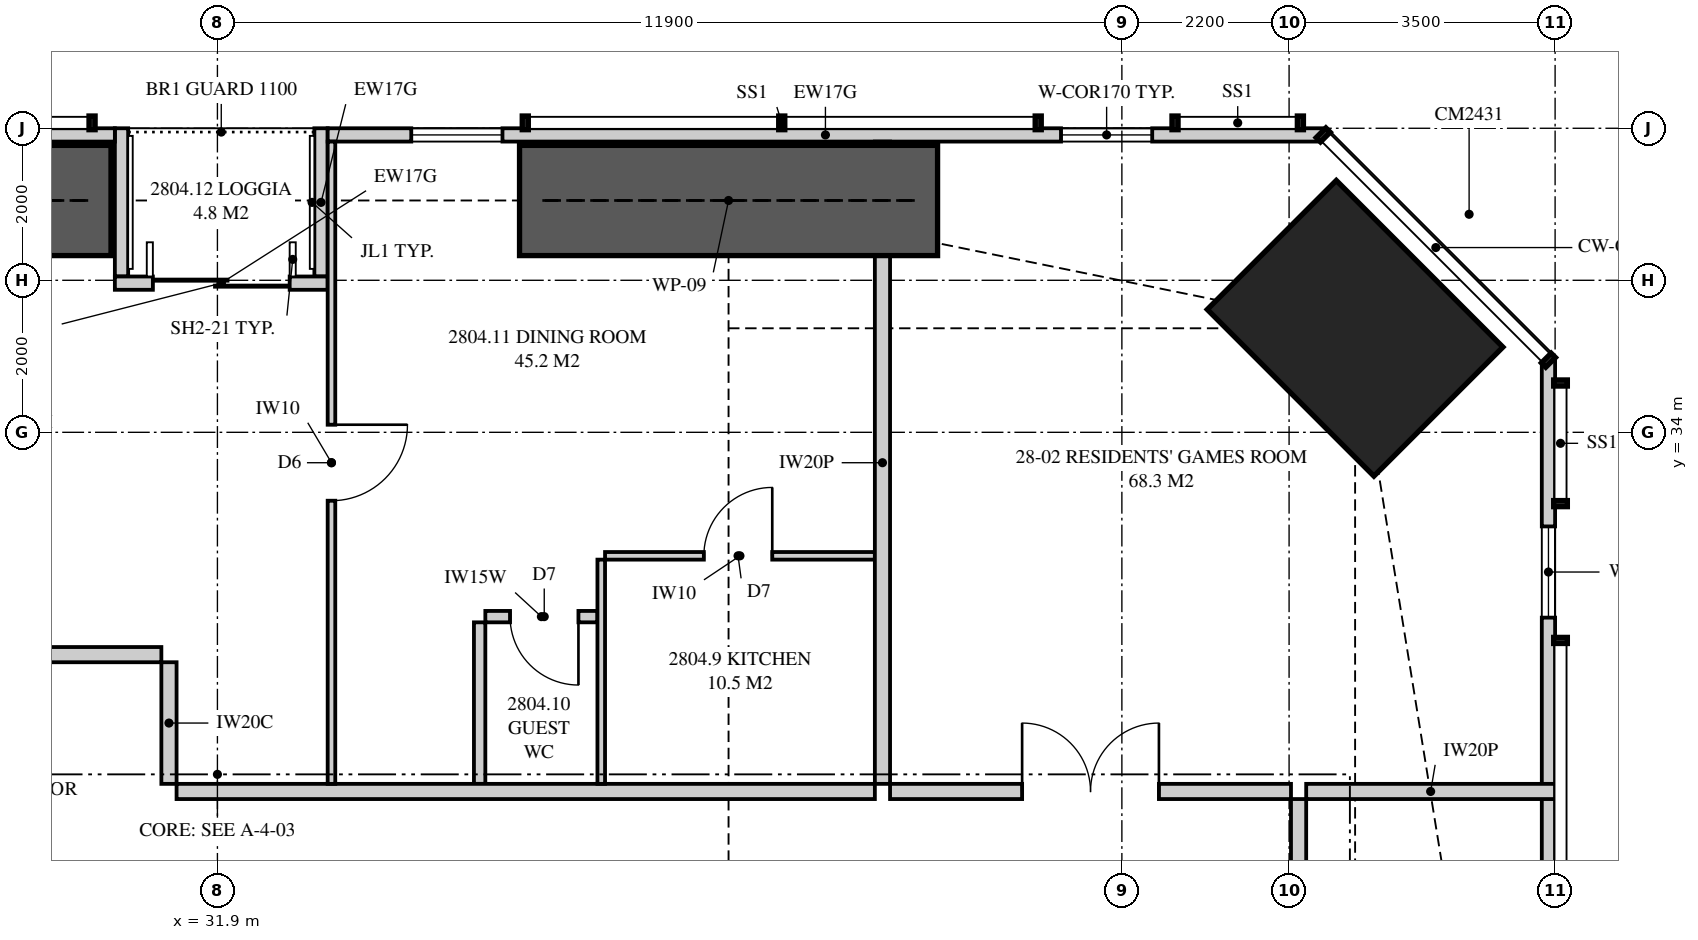
"""IFC4 building model, lengths in metres.
Left out: names, types, materials, properties, quantities, classifications, styles, units other than length and angle.
Written with IfcOpenShell. Run it as: python <this file> out.ifc"""

import sys

from ifc_helpers import new_model, si_unit, direction, frame, frame_2d, origin, origin_2d, place, context, subcontext, project, spatial, polyline, rectangle, outline, extrude, element, fill, save


model = new_model("IFC4")
c1 = context("Model", 3, precision=1e-05, world=origin(), true_north=direction((0.0, 1.0)))
c2 = subcontext(c1, "Body", "Model", "MODEL_VIEW")
j1 = project(units=[si_unit("LENGTHUNIT", "METRE"), si_unit("PLANEANGLEUNIT", "RADIAN")], contexts=[c1])
p1 = place(None, origin())
s1 = spatial("IfcSite", under=j1, at=p1, CompositionType="ELEMENT")
p2 = place(p1, origin())
s2 = spatial("IfcBuilding", under=s1, at=p2, CompositionType="ELEMENT")
p3 = place(p2, frame((0.0, 0.0, 104.85)))
s3 = spatial("IfcBuildingStorey", under=s2, at=p3, CompositionType="ELEMENT", Elevation=104.85)
p4 = place(p3, frame((46.869, 35.369, 0.0), z_axis=(0.0, 0.0, 1.0), x_axis=(-0.707106781187, -0.707106781187, 0.0)))
e1 = element("IfcColumn", 1, at=p4, inside=s3, PredefinedType="COLUMN", context=c2, shape_type="SweptSolid", body=[
    extrude(rectangle(XDim=2.4, YDim=3.1, at=origin_2d()), origin(), (0.0, 0.0, 1.0), 3.35),
])
p5 = place(p3, frame((49.413, 3.051, 0.0), z_axis=(0.0, 0.0, 1.0), x_axis=(0.0, 1.0, 0.0)))
e2 = element("IfcWall", 2, at=p5, inside=s3, PredefinedType="SOLIDWALL", context=c2, shape_type="SweptSolid", body=[
    extrude(outline(polyline([(0.0, 0.0), (31.897, 0.0), (31.897, 3.11), (22.167, 3.11), (22.167, 2.15), (22.074, 2.15), (22.074, 3.11), (21.949, 3.11), (21.949, 2.15), (9.949, 2.15), (9.949, 3.11), (9.823, 3.11), (9.823, 2.15), (9.73, 2.15), (9.73, 3.11), (0.0, 3.11), (0.0, 0.0)])), frame((0.0, 0.087, 0.0), z_axis=(0.0, -1.0, 0.0), x_axis=(1.0, 0.0, 0.0)), (0.0, 0.0, 1.0), 0.175),
])
p6 = place(p5, frame((2.224, 0.0, 0.4)))
e3 = element("IfcOpeningElement", 3, at=p6, cuts=e2, PredefinedType="OPENING", context=c2, shape_type="SweptSolid", body=[
    extrude(rectangle(XDim=1.8, YDim=1.7, at=frame_2d((0.9, 0.85))), frame((0.0, 0.097, 0.0), z_axis=(0.0, -1.0, 0.0), x_axis=(1.0, 0.0, 0.0)), (0.0, 0.0, 1.0), 0.195),
])
p7 = place(p5, frame((14.849, 0.0, 0.4)))
e4 = element("IfcOpeningElement", 4, at=p7, cuts=e2, PredefinedType="OPENING", context=c2, shape_type="SweptSolid", body=[
    extrude(rectangle(XDim=1.2, YDim=1.7, at=frame_2d((0.6, 0.85))), frame((0.0, 0.097, 0.0), z_axis=(0.0, -1.0, 0.0), x_axis=(1.0, 0.0, 0.0)), (0.0, 0.0, 1.0), 0.195),
])
p8 = place(p5, frame((28.51, 0.0, 0.4)))
e5 = element("IfcOpeningElement", 5, at=p8, cuts=e2, PredefinedType="OPENING", context=c2, shape_type="SweptSolid", body=[
    extrude(rectangle(XDim=1.2, YDim=1.7, at=frame_2d((0.6, 0.85))), frame((0.0, 0.097, 0.0), z_axis=(0.0, -1.0, 0.0), x_axis=(1.0, 0.0, 0.0)), (0.0, 0.0, 1.0), 0.195),
])
p9 = place(p3, frame((46.449, 37.913, 0.0), z_axis=(0.0, 0.0, 1.0), x_axis=(-1.0, 0.0, 0.0)))
e6 = element("IfcWall", 6, at=p9, inside=s3, PredefinedType="SOLIDWALL", context=c2, shape_type="SweptSolid", body=[
    extrude(outline(polyline([(0.0, 0.0), (13.098, 0.0), (13.098, 2.15), (7.824, 2.15), (7.824, 3.11), (7.666, 3.11), (7.666, 2.15), (7.62, 2.15), (7.62, 3.11), (0.0, 3.11), (0.0, 0.0)])), frame((0.0, 0.087, 0.0), z_axis=(0.0, -1.0, 0.0), x_axis=(1.0, 0.0, 0.0)), (0.0, 0.0, 1.0), 0.175),
])
p10 = place(p9, frame((2.25, 0.0, 0.4)))
e7 = element("IfcOpeningElement", 7, at=p10, cuts=e6, PredefinedType="OPENING", context=c2, shape_type="SweptSolid", body=[
    extrude(rectangle(XDim=1.2, YDim=1.7, at=frame_2d((0.6, 0.85))), frame((0.0, 0.097, 0.0), z_axis=(0.0, -1.0, 0.0), x_axis=(1.0, 0.0, 0.0)), (0.0, 0.0, 1.0), 0.195),
])
p11 = place(p9, frame((10.798, 0.0, 0.4)))
e8 = element("IfcOpeningElement", 8, at=p11, cuts=e6, PredefinedType="OPENING", context=c2, shape_type="SweptSolid", body=[
    extrude(rectangle(XDim=1.2, YDim=1.7, at=frame_2d((0.6, 0.85))), frame((0.0, 0.097, 0.0), z_axis=(0.0, -1.0, 0.0), x_axis=(1.0, 0.0, 0.0)), (0.0, 0.0, 1.0), 0.195),
])
p12 = place(p3, frame((30.551, 37.913, 0.0), z_axis=(0.0, 0.0, 1.0), x_axis=(-1.0, 0.0, 0.0)))
e9 = element("IfcWall", 9, at=p12, inside=s3, PredefinedType="SOLIDWALL", context=c2, shape_type="SweptSolid", body=[
    extrude(outline(polyline([(0.0, 0.0), (21.499, 0.0), (21.499, 3.11), (13.879, 3.11), (13.879, 2.15), (13.834, 2.15), (13.834, 3.11), (13.676, 3.11), (13.676, 2.15), (0.0, 2.15), (0.0, 0.0)])), frame((0.0, 0.087, 0.0), z_axis=(0.0, -1.0, 0.0), x_axis=(1.0, 0.0, 0.0)), (0.0, 0.0, 1.0), 0.175),
])
p13 = place(p12, frame((5.826, 0.0, 0.4)))
e10 = element("IfcOpeningElement", 10, at=p13, cuts=e9, PredefinedType="OPENING", context=c2, shape_type="SweptSolid", body=[
    extrude(rectangle(XDim=1.8, YDim=1.7, at=frame_2d((0.9, 0.85))), frame((0.0, 0.097, 0.0), z_axis=(0.0, -1.0, 0.0), x_axis=(1.0, 0.0, 0.0)), (0.0, 0.0, 1.0), 0.195),
])
p14 = place(p12, frame((8.993, 0.0, 0.4)))
e11 = element("IfcOpeningElement", 11, at=p14, cuts=e9, PredefinedType="OPENING", context=c2, shape_type="SweptSolid", body=[
    extrude(rectangle(XDim=1.8, YDim=1.7, at=frame_2d((0.9, 0.85))), frame((0.0, 0.097, 0.0), z_axis=(0.0, -1.0, 0.0), x_axis=(1.0, 0.0, 0.0)), (0.0, 0.0, 1.0), 0.195),
])
p15 = place(p12, frame((16.566, 0.0, 0.4)))
e12 = element("IfcOpeningElement", 12, at=p15, cuts=e9, PredefinedType="OPENING", context=c2, shape_type="SweptSolid", body=[
    extrude(rectangle(XDim=1.8, YDim=1.7, at=frame_2d((0.9, 0.85))), frame((0.0, 0.097, 0.0), z_axis=(0.0, -1.0, 0.0), x_axis=(1.0, 0.0, 0.0)), (0.0, 0.0, 1.0), 0.195),
])
p16 = place(p3, frame((33.351, 35.962, 0.0), z_axis=(0.0, 0.0, 1.0), x_axis=(-1.0, 0.0, 0.0)))
e13 = element("IfcWall", 13, at=p16, inside=s3, PredefinedType="SOLIDWALL", context=c2, shape_type="SweptSolid", body=[
    extrude(rectangle(XDim=2.8, YDim=0.175, at=frame_2d((1.4, 0.0))), origin(), (0.0, 0.0, 1.0), 3.11),
])
p17 = place(p16, frame((0.5, 0.0, 0.0)))
e14 = element("IfcOpeningElement", 14, at=p17, cuts=e13, PredefinedType="OPENING", context=c2, shape_type="SweptSolid", body=[
    extrude(rectangle(XDim=1.8, YDim=2.1, at=frame_2d((0.9, 1.05))), frame((0.0, 0.097, 0.0), z_axis=(0.0, -1.0, 0.0), x_axis=(1.0, 0.0, 0.0)), (0.0, 0.0, 1.0), 0.195),
])
for number, where, z_axis, x_axis in (
    (15, (33.263, 38.0, 0.0), (0.0, 0.0, 1.0), (0.0, -1.0, 0.0)),
    (16, (30.638, 38.0, 0.0), (0.0, 0.0, 1.0), (0.0, -1.0, 0.0)),
):
    element("IfcWall", number, at=place(p3, frame(where, z_axis=z_axis, x_axis=x_axis)), inside=s3, PredefinedType="SOLIDWALL", context=c2, shape_type="SweptSolid", body=[
        extrude(outline(polyline([(0.0, 0.0), (1.95, 0.0), (1.95, 3.11), (1.75, 3.11), (1.75, 2.15), (0.15, 2.15), (0.15, 3.11), (0.0, 3.11), (0.0, 0.0)])), frame((0.0, 0.087, 0.0), z_axis=(0.0, -1.0, 0.0), x_axis=(1.0, 0.0, 0.0)), (0.0, 0.0, 1.0), 0.175),
    ])
p18 = place(p3, frame((40.65, 37.825, 0.0), z_axis=(0.0, 0.0, 1.0), x_axis=(0.0, -1.0, 0.0)))
e17 = element("IfcWall", 17, at=p18, inside=s3, PredefinedType="PARTITIONING", context=c2, shape_type="SweptSolid", body=[
    extrude(outline(polyline([(0.259, 3.11), (0.0, 3.11), (0.0, 0.0), (0.529, 0.0), (0.529, 0.12), (1.021, 0.12), (1.021, 0.0), (8.45, 0.0), (8.45, 3.11), (3.766, 3.11), (3.766, 2.51), (2.117, 2.51), (2.117, 2.15), (1.021, 2.15), (1.021, 2.03), (0.529, 2.03), (0.529, 2.15), (0.259, 2.15), (0.259, 3.11)])), frame((0.0, 0.1, 0.0), z_axis=(0.0, -1.0, 0.0), x_axis=(1.0, 0.0, 0.0)), (0.0, 0.0, 1.0), 0.2),
])
p19 = place(p3, frame((37.0, 32.375, 0.0), z_axis=(0.0, 0.0, 1.0), x_axis=(1.0, 0.0, 0.0)))
e18 = element("IfcWall", 18, at=p19, inside=s3, PredefinedType="PARTITIONING", context=c2, shape_type="SweptSolid", body=[
    extrude(outline(polyline([(0.0, 0.0), (3.55, 0.0), (3.55, 3.11), (1.912, 3.11), (1.912, 2.541), (1.338, 2.541), (1.338, 3.11), (0.0, 3.11), (0.0, 0.0)])), frame((0.0, 0.05, 0.0), z_axis=(0.0, -1.0, 0.0), x_axis=(1.0, 0.0, 0.0)), (0.0, 0.0, 1.0), 0.1),
])
p20 = place(p19, frame((1.3, 0.0, 0.0)))
e19 = element("IfcOpeningElement", 19, at=p20, cuts=e18, PredefinedType="OPENING", context=c2, shape_type="SweptSolid", body=[
    extrude(rectangle(XDim=0.9, YDim=2.1, at=frame_2d((0.45, 1.05))), frame((0.0, 0.06, 0.0), z_axis=(0.0, -1.0, 0.0), x_axis=(1.0, 0.0, 0.0)), (0.0, 0.0, 1.0), 0.12),
])
p21 = place(p3, frame((36.95, 32.325, 0.0), z_axis=(0.0, 0.0, 1.0), x_axis=(0.0, -1.0, 0.0)))
e20 = element("IfcWall", 20, at=p21, inside=s3, PredefinedType="PARTITIONING", context=c2, shape_type="SweptSolid", body=[
    extrude(rectangle(XDim=2.95, YDim=0.1, at=frame_2d((1.475, 0.0))), origin(), (0.0, 0.0, 1.0), 3.11),
])
p22 = place(p3, frame((35.425, 31.575, 0.0), z_axis=(0.0, 0.0, 1.0), x_axis=(1.0, 0.0, 0.0)))
e21 = element("IfcWall", 21, at=p22, inside=s3, PredefinedType="PLUMBINGWALL", context=c2, shape_type="SweptSolid", body=[
    extrude(rectangle(XDim=1.475, YDim=0.15, at=frame_2d((0.737, 0.0))), origin(), (0.0, 0.0, 1.0), 3.11),
])
p23 = place(p22, frame((0.325, 0.0, 0.0)))
e22 = element("IfcOpeningElement", 22, at=p23, cuts=e21, PredefinedType="OPENING", context=c2, shape_type="SweptSolid", body=[
    extrude(rectangle(XDim=0.9, YDim=2.1, at=frame_2d((0.45, 1.05))), frame((0.0, 0.085, 0.0), z_axis=(0.0, -1.0, 0.0), x_axis=(1.0, 0.0, 0.0)), (0.0, 0.0, 1.0), 0.17),
])
p24 = place(p3, frame((35.35, 31.5, 0.0), z_axis=(0.0, 0.0, 1.0), x_axis=(0.0, -1.0, 0.0)))
e23 = element("IfcWall", 23, at=p24, inside=s3, PredefinedType="PLUMBINGWALL", context=c2, shape_type="SweptSolid", body=[
    extrude(rectangle(XDim=2.125, YDim=0.15, at=frame_2d((1.062, 0.0))), origin(), (0.0, 0.0, 1.0), 3.11),
])
p25 = place(p3, frame((33.401, 37.825, 0.0), z_axis=(0.0, 0.0, 1.0), x_axis=(0.0, -1.0, 0.0)))
e24 = element("IfcWall", 24, at=p25, inside=s3, PredefinedType="PARTITIONING", context=c2, shape_type="SweptSolid", body=[
    extrude(outline(polyline([(0.0, 0.0), (8.45, 0.0), (8.45, 3.11), (1.635, 3.11), (1.635, 2.15), (0.0, 2.15), (0.0, 3.11), (0.0, 0.0)])), frame((0.0, 0.05, 0.0), z_axis=(0.0, -1.0, 0.0), x_axis=(1.0, 0.0, 0.0)), (0.0, 0.0, 1.0), 0.1),
])
p26 = place(p25, frame((3.725, 0.0, 0.0)))
e25 = element("IfcOpeningElement", 25, at=p26, cuts=e24, PredefinedType="OPENING", context=c2, shape_type="SweptSolid", body=[
    extrude(rectangle(XDim=1.0, YDim=2.1, at=frame_2d((0.5, 1.05))), frame((0.0, 0.06, 0.0), z_axis=(0.0, -1.0, 0.0), x_axis=(1.0, 0.0, 0.0)), (0.0, 0.0, 1.0), 0.12),
])
p27 = place(p3, frame((40.75, 29.275, 0.0), z_axis=(0.0, 0.0, 1.0), x_axis=(1.0, 0.0, 0.0)))
e26 = element("IfcWall", 26, at=p27, inside=s3, PredefinedType="PARTITIONING", context=c2, shape_type="SweptSolid", body=[
    extrude(rectangle(XDim=5.275, YDim=0.2, at=frame_2d((2.637, 0.0))), origin(), (0.0, 0.0, 1.0), 3.11),
])
p28 = place(p27, frame((1.738, 0.0, 0.0)))
e27 = element("IfcOpeningElement", 27, at=p28, cuts=e26, PredefinedType="OPENING", context=c2, shape_type="SweptSolid", body=[
    extrude(rectangle(XDim=1.8, YDim=2.1, at=frame_2d((0.9, 1.05))), frame((0.0, 0.11, 0.0), z_axis=(0.0, -1.0, 0.0), x_axis=(1.0, 0.0, 0.0)), (0.0, 0.0, 1.0), 0.22),
])
p29 = place(p3, frame((46.225, 29.275, 0.0), z_axis=(0.0, 0.0, 1.0), x_axis=(1.0, 0.0, 0.0)))
e28 = element("IfcWall", 28, at=p29, inside=s3, PredefinedType="PARTITIONING", context=c2, shape_type="SweptSolid", body=[
    extrude(outline(polyline([(0.0, 0.0), (3.275, 0.0), (3.275, 3.11), (2.554, 3.11), (2.554, 2.15), (0.805, 2.15), (0.805, 2.541), (0.306, 2.541), (0.306, 3.11), (0.0, 3.11), (0.0, 0.0)])), frame((0.0, 0.1, 0.0), z_axis=(0.0, -1.0, 0.0), x_axis=(1.0, 0.0, 0.0)), (0.0, 0.0, 1.0), 0.2),
])
p30 = place(p3, frame((46.125, 7.825, 0.0), z_axis=(0.0, 0.0, 1.0), x_axis=(0.0, 1.0, 0.0)))
e29 = element("IfcWall", 29, at=p30, inside=s3, PredefinedType="PARTITIONING", context=c2, shape_type="SweptSolid", body=[
    extrude(outline(polyline([(0.0, 0.0), (21.35, 0.0), (21.35, 3.11), (17.512, 3.11), (17.512, 2.541), (16.838, 2.541), (16.838, 3.11), (5.512, 3.11), (5.512, 2.541), (4.838, 2.541), (4.838, 3.11), (0.0, 3.11), (0.0, 0.0)])), frame((0.0, 0.1, 0.0), z_axis=(0.0, -1.0, 0.0), x_axis=(1.0, 0.0, 0.0)), (0.0, 0.0, 1.0), 0.2),
])
p31 = place(p30, frame((9.775, 0.0, 0.0)))
e30 = element("IfcOpeningElement", 30, at=p31, cuts=e29, PredefinedType="OPENING", context=c2, shape_type="SweptSolid", body=[
    extrude(rectangle(XDim=1.8, YDim=2.1, at=frame_2d((0.9, 1.05))), frame((0.0, 0.11, 0.0), z_axis=(0.0, -1.0, 0.0), x_axis=(1.0, 0.0, 0.0)), (0.0, 0.0, 1.0), 0.22),
])
p32 = place(p30, frame((19.5, 0.0, 0.0)))
e31 = element("IfcOpeningElement", 31, at=p32, cuts=e29, PredefinedType="OPENING", context=c2, shape_type="SweptSolid", body=[
    extrude(rectangle(XDim=1.0, YDim=2.1, at=frame_2d((0.5, 1.05))), frame((0.0, 0.11, 0.0), z_axis=(0.0, -1.0, 0.0), x_axis=(1.0, 0.0, 0.0)), (0.0, 0.0, 1.0), 0.22),
])
p33 = place(p3, frame((31.363, 29.275, 0.0), z_axis=(0.0, 0.0, 1.0), x_axis=(1.0, 0.0, 0.0)))
e32 = element("IfcWall", 32, at=p33, inside=s3, PredefinedType="PARTITIONING", context=c2, shape_type="SweptSolid", body=[
    extrude(outline(polyline([(0.0, 0.0), (9.188, 0.0), (9.188, 3.11), (7.6, 3.11), (7.6, 2.541), (6.925, 2.541), (6.925, 3.11), (0.0, 3.11), (0.0, 0.0)])), frame((0.0, 0.1, 0.0), z_axis=(0.0, -1.0, 0.0), x_axis=(1.0, 0.0, 0.0)), (0.0, 0.0, 1.0), 0.2),
])
p34 = place(p3, frame((27.163, 31.075, 0.0), z_axis=(0.0, 0.0, 1.0), x_axis=(1.0, 0.0, 0.0)))
e33 = element("IfcWall", 33, at=p34, inside=s3, PredefinedType="PARTITIONING", context=c2, shape_type="SweptSolid", body=[
    extrude(outline(polyline([(0.0, 0.0), (4.0, 0.0), (4.0, 3.11), (0.925, 3.11), (0.925, 2.541), (0.25, 2.541), (0.25, 3.11), (0.0, 3.11), (0.0, 0.0)])), frame((0.0, 0.1, 0.0), z_axis=(0.0, -1.0, 0.0), x_axis=(1.0, 0.0, 0.0)), (0.0, 0.0, 1.0), 0.2),
])
p35 = place(p3, frame((31.262, 29.375, 0.0), z_axis=(0.0, 0.0, 1.0), x_axis=(0.0, 1.0, 0.0)))
e34 = element("IfcWall", 34, at=p35, inside=s3, PredefinedType="PARTITIONING", context=c2, shape_type="SweptSolid", body=[
    extrude(rectangle(XDim=1.6, YDim=0.2, at=frame_2d((0.8, 0.0))), origin(), (0.0, 0.0, 1.0), 3.11),
])
for number, where, z_axis, x_axis in (
    (35, (35.875, 37.05, 0.0), (0.0, 0.0, 1.0), (1.0, 0.0, 0.0)),
    (36, (25.0, 37.05, 0.0), (0.0, 0.0, 1.0), (1.0, 0.0, 0.0)),
):
    element("IfcWall", number, at=place(p3, frame(where, z_axis=z_axis, x_axis=x_axis)), inside=s3, PredefinedType="SHEAR", context=c2, shape_type="SweptSolid", body=[
        extrude(rectangle(XDim=5.5, YDim=1.45, at=frame_2d((2.75, 0.0))), origin(), (0.0, 0.0, 1.0), 3.35),
    ])
p36 = place(p8, origin())
e37 = element("IfcWindow", 37, at=p36, inside=s3, PartitioningType="SINGLE_PANEL", PredefinedType="WINDOW", context=c2, shape_type="SweptSolid", body=[
    extrude(rectangle(XDim=1.2, YDim=1.7, at=frame_2d((0.6, 0.85))), frame((0.0, 0.03, 0.0), z_axis=(0.0, -1.0, 0.0), x_axis=(1.0, 0.0, 0.0)), (0.0, 0.0, 1.0), 0.06),
])
fill(e5, e37)
p37 = place(p10, origin())
e38 = element("IfcWindow", 38, at=p37, inside=s3, PartitioningType="SINGLE_PANEL", PredefinedType="WINDOW", context=c2, shape_type="SweptSolid", body=[
    extrude(rectangle(XDim=1.2, YDim=1.7, at=frame_2d((0.6, 0.85))), frame((0.0, 0.03, 0.0), z_axis=(0.0, -1.0, 0.0), x_axis=(1.0, 0.0, 0.0)), (0.0, 0.0, 1.0), 0.06),
])
fill(e7, e38)
p38 = place(p11, origin())
e39 = element("IfcWindow", 39, at=p38, inside=s3, PartitioningType="SINGLE_PANEL", PredefinedType="WINDOW", context=c2, shape_type="SweptSolid", body=[
    extrude(rectangle(XDim=1.2, YDim=1.7, at=frame_2d((0.6, 0.85))), frame((0.0, 0.03, 0.0), z_axis=(0.0, -1.0, 0.0), x_axis=(1.0, 0.0, 0.0)), (0.0, 0.0, 1.0), 0.06),
])
fill(e8, e39)
p39 = place(p17, origin())
e40 = element("IfcDoor", 40, at=p39, inside=s3, OperationType="SLIDING_TO_LEFT", PredefinedType="DOOR", context=c2, shape_type="SweptSolid", body=[
    extrude(rectangle(XDim=1.8, YDim=2.1, at=frame_2d((0.9, 1.05))), frame((0.0, 0.025, 0.0), z_axis=(0.0, -1.0, 0.0), x_axis=(1.0, 0.0, 0.0)), (0.0, 0.0, 1.0), 0.05),
])
fill(e14, e40)
p40 = place(p20, origin())
e41 = element("IfcDoor", 41, at=p40, inside=s3, OperationType="SINGLE_SWING_RIGHT", PredefinedType="DOOR", context=c2, shape_type="SweptSolid", body=[
    extrude(rectangle(XDim=0.9, YDim=2.1, at=frame_2d((0.45, 1.05))), frame((0.0, 0.025, 0.0), z_axis=(0.0, -1.0, 0.0), x_axis=(1.0, 0.0, 0.0)), (0.0, 0.0, 1.0), 0.05),
])
fill(e19, e41)
p41 = place(p23, frame((0.9, 0.0, 0.0), z_axis=(0.0, 0.0, 1.0), x_axis=(-1.0, 0.0, 0.0)))
e42 = element("IfcDoor", 42, at=p41, inside=s3, OperationType="SINGLE_SWING_LEFT", PredefinedType="DOOR", context=c2, shape_type="SweptSolid", body=[
    extrude(rectangle(XDim=0.9, YDim=2.1, at=frame_2d((0.45, 1.05))), frame((0.0, 0.025, 0.0), z_axis=(0.0, -1.0, 0.0), x_axis=(1.0, 0.0, 0.0)), (0.0, 0.0, 1.0), 0.05),
])
fill(e22, e42)
p42 = place(p26, origin())
e43 = element("IfcDoor", 43, at=p42, inside=s3, OperationType="SINGLE_SWING_LEFT", PredefinedType="DOOR", context=c2, shape_type="SweptSolid", body=[
    extrude(rectangle(XDim=1.0, YDim=2.1, at=frame_2d((0.5, 1.05))), frame((0.0, 0.025, 0.0), z_axis=(0.0, -1.0, 0.0), x_axis=(1.0, 0.0, 0.0)), (0.0, 0.0, 1.0), 0.05),
])
fill(e25, e43)
p43 = place(p28, origin())
e44 = element("IfcDoor", 44, at=p43, inside=s3, OperationType="DOUBLE_DOOR_SINGLE_SWING", PredefinedType="DOOR", context=c2, shape_type="SweptSolid", body=[
    extrude(rectangle(XDim=1.8, YDim=2.1, at=frame_2d((0.9, 1.05))), frame((0.0, 0.025, 0.0), z_axis=(0.0, -1.0, 0.0), x_axis=(1.0, 0.0, 0.0)), (0.0, 0.0, 1.0), 0.05),
])
fill(e27, e44)
save(model, sys.argv[1])
